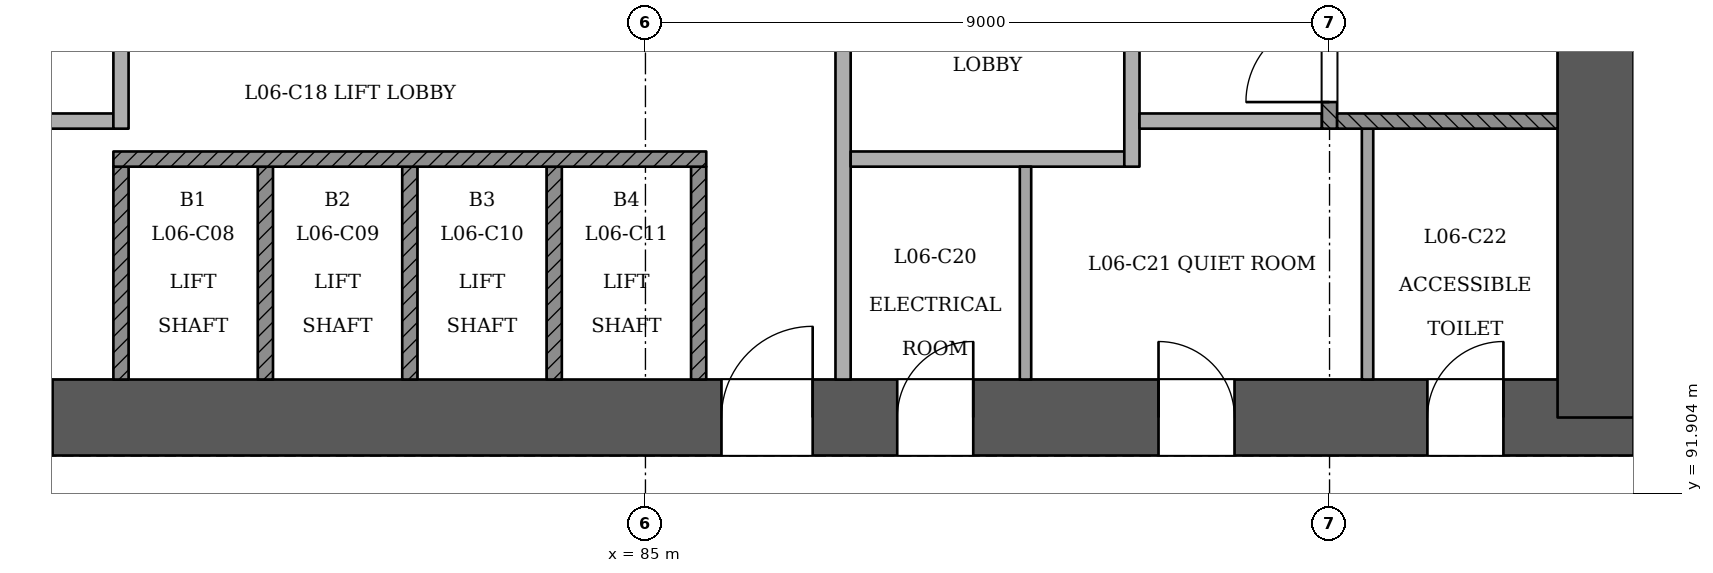
"""IFC4 building model, lengths in metres.
Left out: names, types, materials, properties, quantities, classifications, styles, units other than length and angle.
Written with IfcOpenShell. Run it as: python <this file> out.ifc"""

import sys

from ifc_helpers import new_model, si_unit, direction, frame, frame_2d, origin, place, context, subcontext, project, spatial, rectangle, extrude, element, fill, save


model = new_model("IFC4")
c1 = context("Model", 3, precision=1e-05, world=origin(), true_north=direction((0.0, 1.0)))
c2 = subcontext(c1, "Body", "Model", "MODEL_VIEW")
j1 = project(units=[si_unit("LENGTHUNIT", "METRE"), si_unit("PLANEANGLEUNIT", "RADIAN")], contexts=[c1])
p1 = place(None, origin())
s1 = spatial("IfcSite", under=j1, at=p1, CompositionType="ELEMENT")
p2 = place(p1, origin())
s2 = spatial("IfcBuilding", under=s1, at=p2, CompositionType="ELEMENT")
p3 = place(p2, frame((0.0, 0.0, 30.6)))
s3 = spatial("IfcBuildingStorey", under=s2, at=p3, CompositionType="ELEMENT", Elevation=30.6)
p4 = place(p3, frame((72.5, 92.9, 0.0), z_axis=(0.0, 0.0, 1.0), x_axis=(1.0, 0.0, 0.0)))
e1 = element("IfcWall", 1, at=p4, inside=s3, PredefinedType="SHEAR", context=c2, shape_type="SweptSolid", body=[
    extrude(rectangle(XDim=25.5, YDim=1.0, at=frame_2d((12.75, 0.0))), origin(), (0.0, 0.0, 1.0), 3.6),
])
p5 = place(p4, frame((1.3, 0.0, 0.0)))
e2 = element("IfcOpeningElement", 2, at=p5, cuts=e1, PredefinedType="OPENING", context=c2, shape_type="SweptSolid", body=[
    extrude(rectangle(XDim=1.2, YDim=2.1, at=frame_2d((0.6, 1.05))), frame((0.0, 0.51, 0.0), z_axis=(0.0, -1.0, 0.0), x_axis=(1.0, 0.0, 0.0)), (0.0, 0.0, 1.0), 1.021),
])
p6 = place(p4, frame((3.5, 0.0, 0.0)))
e3 = element("IfcOpeningElement", 3, at=p6, cuts=e1, PredefinedType="OPENING", context=c2, shape_type="SweptSolid", body=[
    extrude(rectangle(XDim=1.2, YDim=2.1, at=frame_2d((0.6, 1.05))), frame((0.0, 0.51, 0.0), z_axis=(0.0, -1.0, 0.0), x_axis=(1.0, 0.0, 0.0)), (0.0, 0.0, 1.0), 1.021),
])
p7 = place(p4, frame((13.5, 0.0, 0.0)))
e4 = element("IfcOpeningElement", 4, at=p7, cuts=e1, PredefinedType="OPENING", context=c2, shape_type="SweptSolid", body=[
    extrude(rectangle(XDim=1.2, YDim=2.1, at=frame_2d((0.6, 1.05))), frame((0.0, 0.51, 0.0), z_axis=(0.0, -1.0, 0.0), x_axis=(1.0, 0.0, 0.0)), (0.0, 0.0, 1.0), 1.021),
])
p8 = place(p4, frame((15.812, 0.0, 0.0)))
e5 = element("IfcOpeningElement", 5, at=p8, cuts=e1, PredefinedType="OPENING", context=c2, shape_type="SweptSolid", body=[
    extrude(rectangle(XDim=1.0, YDim=2.1, at=frame_2d((0.5, 1.05))), frame((0.0, 0.51, 0.0), z_axis=(0.0, -1.0, 0.0), x_axis=(1.0, 0.0, 0.0)), (0.0, 0.0, 1.0), 1.021),
])
p9 = place(p4, frame((19.25, 0.0, 0.0)))
e6 = element("IfcOpeningElement", 6, at=p9, cuts=e1, PredefinedType="OPENING", context=c2, shape_type="SweptSolid", body=[
    extrude(rectangle(XDim=1.0, YDim=2.1, at=frame_2d((0.5, 1.05))), frame((0.0, 0.51, 0.0), z_axis=(0.0, -1.0, 0.0), x_axis=(1.0, 0.0, 0.0)), (0.0, 0.0, 1.0), 1.021),
])
p10 = place(p4, frame((22.788, 0.0, 0.0)))
e7 = element("IfcOpeningElement", 7, at=p10, cuts=e1, PredefinedType="OPENING", context=c2, shape_type="SweptSolid", body=[
    extrude(rectangle(XDim=1.0, YDim=2.1, at=frame_2d((0.5, 1.05))), frame((0.0, 0.51, 0.0), z_axis=(0.0, -1.0, 0.0), x_axis=(1.0, 0.0, 0.0)), (0.0, 0.0, 1.0), 1.021),
])
p11 = place(p3, frame((97.5, 92.9, 0.0), z_axis=(0.0, 0.0, 1.0), x_axis=(0.0, 1.0, 0.0)))
e8 = element("IfcWall", 8, at=p11, inside=s3, PredefinedType="SHEAR", context=c2, shape_type="SweptSolid", body=[
    extrude(rectangle(XDim=11.5, YDim=1.0, at=frame_2d((5.75, 0.0))), origin(), (0.0, 0.0, 1.0), 3.6),
])
p12 = place(p3, frame((61.273, 96.374, 0.0), z_axis=(0.0, 0.0, 1.0), x_axis=(0.5000018851, -0.866024315419, 0.0)))
e9 = element("IfcWall", 9, at=p12, inside=s3, PredefinedType="PARTITIONING", context=c2, shape_type="SweptSolid", body=[
    extrude(rectangle(XDim=45.0, YDim=0.15, at=frame_2d((22.5, 0.0))), origin(), (0.0, 0.0, 1.0), 2.7),
])
p13 = place(p12, frame((2.829, 0.0, 0.0)))
e10 = element("IfcOpeningElement", 10, at=p13, cuts=e9, PredefinedType="OPENING", context=c2, shape_type="SweptSolid", body=[
    extrude(rectangle(XDim=1.1, YDim=2.1, at=frame_2d((0.55, 1.05))), frame((0.0, 0.085, 0.0), z_axis=(0.0, -1.0, 0.0), x_axis=(1.0, 0.0, 0.0)), (0.0, 0.0, 1.0), 0.171),
])
p14 = place(p12, frame((7.3, 0.0, 0.0)))
e11 = element("IfcOpeningElement", 11, at=p14, cuts=e9, PredefinedType="OPENING", context=c2, shape_type="SweptSolid", body=[
    extrude(rectangle(XDim=1.2, YDim=2.1, at=frame_2d((0.6, 1.05))), frame((0.0, 0.085, 0.0), z_axis=(0.0, -1.0, 0.0), x_axis=(1.0, 0.0, 0.0)), (0.0, 0.0, 1.0), 0.171),
])
p15 = place(p12, frame((14.22, 0.0, 0.0)))
e12 = element("IfcOpeningElement", 12, at=p15, cuts=e9, PredefinedType="OPENING", context=c2, shape_type="SweptSolid", body=[
    extrude(rectangle(XDim=1.0, YDim=2.1, at=frame_2d((0.5, 1.05))), frame((0.0, 0.085, 0.0), z_axis=(0.0, -1.0, 0.0), x_axis=(1.0, 0.0, 0.0)), (0.0, 0.0, 1.0), 0.171),
])
p16 = place(p12, frame((20.895, 0.0, 0.0)))
e13 = element("IfcOpeningElement", 13, at=p16, cuts=e9, PredefinedType="OPENING", context=c2, shape_type="SweptSolid", body=[
    extrude(rectangle(XDim=1.0, YDim=2.1, at=frame_2d((0.5, 1.05))), frame((0.0, 0.085, 0.0), z_axis=(0.0, -1.0, 0.0), x_axis=(1.0, 0.0, 0.0)), (0.0, 0.0, 1.0), 0.171),
])
p17 = place(p12, frame((24.25, 0.0, 0.0)))
e14 = element("IfcOpeningElement", 14, at=p17, cuts=e9, PredefinedType="OPENING", context=c2, shape_type="SweptSolid", body=[
    extrude(rectangle(XDim=1.0, YDim=2.1, at=frame_2d((0.5, 1.05))), frame((0.0, 0.085, 0.0), z_axis=(0.0, -1.0, 0.0), x_axis=(1.0, 0.0, 0.0)), (0.0, 0.0, 1.0), 0.171),
])
p18 = place(p12, frame((29.78, 0.0, 0.0)))
e15 = element("IfcOpeningElement", 15, at=p18, cuts=e9, PredefinedType="OPENING", context=c2, shape_type="SweptSolid", body=[
    extrude(rectangle(XDim=1.0, YDim=2.1, at=frame_2d((0.5, 1.05))), frame((0.0, 0.085, 0.0), z_axis=(0.0, -1.0, 0.0), x_axis=(1.0, 0.0, 0.0)), (0.0, 0.0, 1.0), 0.171),
])
p19 = place(p12, frame((34.3, 0.0, 0.0)))
e16 = element("IfcOpeningElement", 16, at=p19, cuts=e9, PredefinedType="OPENING", context=c2, shape_type="SweptSolid", body=[
    extrude(rectangle(XDim=1.2, YDim=2.1, at=frame_2d((0.6, 1.05))), frame((0.0, 0.085, 0.0), z_axis=(0.0, -1.0, 0.0), x_axis=(1.0, 0.0, 0.0)), (0.0, 0.0, 1.0), 0.171),
])
p20 = place(p12, frame((41.22, 0.0, 0.0)))
e17 = element("IfcOpeningElement", 17, at=p20, cuts=e9, PredefinedType="OPENING", context=c2, shape_type="SweptSolid", body=[
    extrude(rectangle(XDim=1.0, YDim=2.1, at=frame_2d((0.5, 1.05))), frame((0.0, 0.085, 0.0), z_axis=(0.0, -1.0, 0.0), x_axis=(1.0, 0.0, 0.0)), (0.0, 0.0, 1.0), 0.171),
])
p21 = place(p3, frame((86.227, 57.403, 0.0), z_axis=(0.0, 0.0, 1.0), x_axis=(0.5000018851, 0.866024315419, 0.0)))
e18 = element("IfcWall", 18, at=p21, inside=s3, PredefinedType="PARTITIONING", context=c2, shape_type="SweptSolid", body=[
    extrude(rectangle(XDim=45.0, YDim=0.15, at=frame_2d((22.5, 0.0))), origin(), (0.0, 0.0, 1.0), 2.7),
])
p22 = place(p21, frame((0.72, 0.0, 0.0)))
e19 = element("IfcOpeningElement", 19, at=p22, cuts=e18, PredefinedType="OPENING", context=c2, shape_type="SweptSolid", body=[
    extrude(rectangle(XDim=1.0, YDim=2.1, at=frame_2d((0.5, 1.05))), frame((0.0, 0.085, 0.0), z_axis=(0.0, -1.0, 0.0), x_axis=(1.0, 0.0, 0.0)), (0.0, 0.0, 1.0), 0.171),
])
p23 = place(p21, frame((5.22, 0.0, 0.0)))
e20 = element("IfcOpeningElement", 20, at=p23, cuts=e18, PredefinedType="OPENING", context=c2, shape_type="SweptSolid", body=[
    extrude(rectangle(XDim=1.0, YDim=2.1, at=frame_2d((0.5, 1.05))), frame((0.0, 0.085, 0.0), z_axis=(0.0, -1.0, 0.0), x_axis=(1.0, 0.0, 0.0)), (0.0, 0.0, 1.0), 0.171),
])
p24 = place(p21, frame((11.78, 0.0, 0.0)))
e21 = element("IfcOpeningElement", 21, at=p24, cuts=e18, PredefinedType="OPENING", context=c2, shape_type="SweptSolid", body=[
    extrude(rectangle(XDim=1.0, YDim=2.1, at=frame_2d((0.5, 1.05))), frame((0.0, 0.085, 0.0), z_axis=(0.0, -1.0, 0.0), x_axis=(1.0, 0.0, 0.0)), (0.0, 0.0, 1.0), 0.171),
])
p25 = place(p21, frame((14.22, 0.0, 0.0)))
e22 = element("IfcOpeningElement", 22, at=p25, cuts=e18, PredefinedType="OPENING", context=c2, shape_type="SweptSolid", body=[
    extrude(rectangle(XDim=1.0, YDim=2.1, at=frame_2d((0.5, 1.05))), frame((0.0, 0.085, 0.0), z_axis=(0.0, -1.0, 0.0), x_axis=(1.0, 0.0, 0.0)), (0.0, 0.0, 1.0), 0.171),
])
p26 = place(p21, frame((19.75, 0.0, 0.0)))
e23 = element("IfcOpeningElement", 23, at=p26, cuts=e18, PredefinedType="OPENING", context=c2, shape_type="SweptSolid", body=[
    extrude(rectangle(XDim=1.0, YDim=2.1, at=frame_2d((0.5, 1.05))), frame((0.0, 0.085, 0.0), z_axis=(0.0, -1.0, 0.0), x_axis=(1.0, 0.0, 0.0)), (0.0, 0.0, 1.0), 0.171),
])
p27 = place(p21, frame((23.105, 0.0, 0.0)))
e24 = element("IfcOpeningElement", 24, at=p27, cuts=e18, PredefinedType="OPENING", context=c2, shape_type="SweptSolid", body=[
    extrude(rectangle(XDim=1.0, YDim=2.1, at=frame_2d((0.5, 1.05))), frame((0.0, 0.085, 0.0), z_axis=(0.0, -1.0, 0.0), x_axis=(1.0, 0.0, 0.0)), (0.0, 0.0, 1.0), 0.171),
])
p28 = place(p21, frame((28.75, 0.0, 0.0)))
e25 = element("IfcOpeningElement", 25, at=p28, cuts=e18, PredefinedType="OPENING", context=c2, shape_type="SweptSolid", body=[
    extrude(rectangle(XDim=1.0, YDim=2.1, at=frame_2d((0.5, 1.05))), frame((0.0, 0.085, 0.0), z_axis=(0.0, -1.0, 0.0), x_axis=(1.0, 0.0, 0.0)), (0.0, 0.0, 1.0), 0.171),
])
p29 = place(p21, frame((32.105, 0.0, 0.0)))
e26 = element("IfcOpeningElement", 26, at=p29, cuts=e18, PredefinedType="OPENING", context=c2, shape_type="SweptSolid", body=[
    extrude(rectangle(XDim=1.0, YDim=2.1, at=frame_2d((0.5, 1.05))), frame((0.0, 0.085, 0.0), z_axis=(0.0, -1.0, 0.0), x_axis=(1.0, 0.0, 0.0)), (0.0, 0.0, 1.0), 0.171),
])
p30 = place(p21, frame((36.504, 0.0, 0.0)))
e27 = element("IfcOpeningElement", 27, at=p30, cuts=e18, PredefinedType="OPENING", context=c2, shape_type="SweptSolid", body=[
    extrude(rectangle(XDim=1.0, YDim=2.1, at=frame_2d((0.5, 1.05))), frame((0.0, 0.085, 0.0), z_axis=(0.0, -1.0, 0.0), x_axis=(1.0, 0.0, 0.0)), (0.0, 0.0, 1.0), 0.171),
])
p31 = place(p21, frame((38.654, 0.0, 0.0)))
e28 = element("IfcOpeningElement", 28, at=p31, cuts=e18, PredefinedType="OPENING", context=c2, shape_type="SweptSolid", body=[
    extrude(rectangle(XDim=1.0, YDim=2.1, at=frame_2d((0.5, 1.05))), frame((0.0, 0.085, 0.0), z_axis=(0.0, -1.0, 0.0), x_axis=(1.0, 0.0, 0.0)), (0.0, 0.0, 1.0), 0.171),
])
p32 = place(p21, frame((41.071, 0.0, 0.0)))
e29 = element("IfcOpeningElement", 29, at=p32, cuts=e18, PredefinedType="OPENING", context=c2, shape_type="SweptSolid", body=[
    extrude(rectangle(XDim=1.1, YDim=2.1, at=frame_2d((0.55, 1.05))), frame((0.0, 0.085, 0.0), z_axis=(0.0, -1.0, 0.0), x_axis=(1.0, 0.0, 0.0)), (0.0, 0.0, 1.0), 0.171),
])
for number, where, z_axis, x_axis in (
    (30, (78.1, 93.4, 0.0), (0.0, 0.0, 1.0), (0.0, 1.0, 0.0)),
    (31, (80.0, 93.4, 0.0), (0.0, 0.0, 1.0), (0.0, 1.0, 0.0)),
    (32, (81.9, 93.4, 0.0), (0.0, 0.0, 1.0), (0.0, 1.0, 0.0)),
    (33, (83.8, 93.4, 0.0), (0.0, 0.0, 1.0), (0.0, 1.0, 0.0)),
    (34, (85.7, 93.4, 0.0), (0.0, 0.0, 1.0), (0.0, 1.0, 0.0)),
):
    element("IfcWall", number, at=place(p3, frame(where, z_axis=z_axis, x_axis=x_axis)), inside=s3, PredefinedType="SOLIDWALL", context=c2, shape_type="SweptSolid", body=[
        extrude(rectangle(XDim=2.8, YDim=0.2, at=frame_2d((1.4, 0.0))), origin(), (0.0, 0.0, 1.0), 3.1),
    ])
p33 = place(p3, frame((87.6, 93.4, 0.0), z_axis=(0.0, 0.0, 1.0), x_axis=(0.0, 1.0, 0.0)))
e35 = element("IfcWall", 35, at=p33, inside=s3, PredefinedType="PARTITIONING", context=c2, shape_type="SweptSolid", body=[
    extrude(rectangle(XDim=7.0, YDim=0.2, at=frame_2d((3.5, 0.0))), origin(), (0.0, 0.0, 1.0), 3.1),
])
p34 = place(p33, frame((4.45, 0.0, 0.0)))
e36 = element("IfcOpeningElement", 36, at=p34, cuts=e35, PredefinedType="OPENING", context=c2, shape_type="SweptSolid", body=[
    extrude(rectangle(XDim=1.1, YDim=2.1, at=frame_2d((0.55, 1.05))), frame((0.0, 0.11, 0.0), z_axis=(0.0, -1.0, 0.0), x_axis=(1.0, 0.0, 0.0)), (0.0, 0.0, 1.0), 0.221),
])
p35 = place(p3, frame((90.0, 93.4, 0.0), z_axis=(0.0, 0.0, 1.0), x_axis=(0.0, 1.0, 0.0)))
e37 = element("IfcWall", 37, at=p35, inside=s3, PredefinedType="PARTITIONING", context=c2, shape_type="SweptSolid", body=[
    extrude(rectangle(XDim=2.8, YDim=0.15, at=frame_2d((1.4, 0.0))), origin(), (0.0, 0.0, 1.0), 3.1),
])
p36 = place(p3, frame((94.5, 93.4, 0.0), z_axis=(0.0, 0.0, 1.0), x_axis=(0.0, 1.0, 0.0)))
e38 = element("IfcWall", 38, at=p36, inside=s3, PredefinedType="PARTITIONING", context=c2, shape_type="SweptSolid", body=[
    extrude(rectangle(XDim=3.3, YDim=0.15, at=frame_2d((1.65, 0.0))), origin(), (0.0, 0.0, 1.0), 3.1),
])
p37 = place(p3, frame((78.0, 96.3, 0.0), z_axis=(0.0, 0.0, 1.0), x_axis=(1.0, 0.0, 0.0)))
e39 = element("IfcWall", 39, at=p37, inside=s3, PredefinedType="SOLIDWALL", context=c2, shape_type="SweptSolid", body=[
    extrude(rectangle(XDim=7.8, YDim=0.2, at=frame_2d((3.9, 0.0))), origin(), (0.0, 0.0, 1.0), 3.1),
])
p38 = place(p3, frame((87.7, 96.3, 0.0), z_axis=(0.0, 0.0, 1.0), x_axis=(1.0, 0.0, 0.0)))
e40 = element("IfcWall", 40, at=p38, inside=s3, PredefinedType="PARTITIONING", context=c2, shape_type="SweptSolid", body=[
    extrude(rectangle(XDim=3.6, YDim=0.2, at=frame_2d((1.8, 0.0))), origin(), (0.0, 0.0, 1.0), 3.1),
])
p39 = place(p3, frame((91.4, 96.2, 0.0), z_axis=(0.0, 0.0, 1.0), x_axis=(0.0, 1.0, 0.0)))
e41 = element("IfcWall", 41, at=p39, inside=s3, PredefinedType="PARTITIONING", context=c2, shape_type="SweptSolid", body=[
    extrude(rectangle(XDim=4.2, YDim=0.2, at=frame_2d((2.1, 0.0))), origin(), (0.0, 0.0, 1.0), 3.1),
])
p40 = place(p39, frame((2.45, 0.0, 0.0)))
e42 = element("IfcOpeningElement", 42, at=p40, cuts=e41, PredefinedType="OPENING", context=c2, shape_type="SweptSolid", body=[
    extrude(rectangle(XDim=1.1, YDim=2.1, at=frame_2d((0.55, 1.05))), frame((0.0, 0.11, 0.0), z_axis=(0.0, -1.0, 0.0), x_axis=(1.0, 0.0, 0.0)), (0.0, 0.0, 1.0), 0.221),
])
p41 = place(p3, frame((76.1, 96.8, 0.0), z_axis=(0.0, 0.0, 1.0), x_axis=(1.0, 0.0, 0.0)))
e43 = element("IfcWall", 43, at=p41, inside=s3, PredefinedType="PARTITIONING", context=c2, shape_type="SweptSolid", body=[
    extrude(rectangle(XDim=1.9, YDim=0.2, at=frame_2d((0.95, 0.0))), origin(), (0.0, 0.0, 1.0), 3.1),
])
p42 = place(p3, frame((78.1, 96.7, 0.0), z_axis=(0.0, 0.0, 1.0), x_axis=(0.0, 1.0, 0.0)))
e44 = element("IfcWall", 44, at=p42, inside=s3, PredefinedType="PARTITIONING", context=c2, shape_type="SweptSolid", body=[
    extrude(rectangle(XDim=3.7, YDim=0.2, at=frame_2d((1.85, 0.0))), origin(), (0.0, 0.0, 1.0), 3.1),
])
p43 = place(p42, frame((1.95, 0.0, 0.0)))
e45 = element("IfcOpeningElement", 45, at=p43, cuts=e44, PredefinedType="OPENING", context=c2, shape_type="SweptSolid", body=[
    extrude(rectangle(XDim=1.1, YDim=2.1, at=frame_2d((0.55, 1.05))), frame((0.0, 0.11, 0.0), z_axis=(0.0, -1.0, 0.0), x_axis=(1.0, 0.0, 0.0)), (0.0, 0.0, 1.0), 0.221),
])
p44 = place(p3, frame((91.5, 96.8, 0.0), z_axis=(0.0, 0.0, 1.0), x_axis=(1.0, 0.0, 0.0)))
e46 = element("IfcWall", 46, at=p44, inside=s3, PredefinedType="PARTITIONING", context=c2, shape_type="SweptSolid", body=[
    extrude(rectangle(XDim=2.4, YDim=0.2, at=frame_2d((1.2, 0.0))), origin(), (0.0, 0.0, 1.0), 3.1),
])
p45 = place(p3, frame((94.0, 96.7, 0.0), z_axis=(0.0, 0.0, 1.0), x_axis=(0.0, 1.0, 0.0)))
e47 = element("IfcWall", 47, at=p45, inside=s3, PredefinedType="SOLIDWALL", context=c2, shape_type="SweptSolid", body=[
    extrude(rectangle(XDim=3.7, YDim=0.2, at=frame_2d((1.85, 0.0))), origin(), (0.0, 0.0, 1.0), 3.1),
])
p46 = place(p45, frame((0.35, 0.0, 0.0)))
e48 = element("IfcOpeningElement", 48, at=p46, cuts=e47, PredefinedType="OPENING", context=c2, shape_type="SweptSolid", body=[
    extrude(rectangle(XDim=1.1, YDim=2.1, at=frame_2d((0.55, 1.05))), frame((0.0, 0.11, 0.0), z_axis=(0.0, -1.0, 0.0), x_axis=(1.0, 0.0, 0.0)), (0.0, 0.0, 1.0), 0.221),
])
p47 = place(p3, frame((94.1, 96.8, 0.0), z_axis=(0.0, 0.0, 1.0), x_axis=(1.0, 0.0, 0.0)))
e49 = element("IfcWall", 49, at=p47, inside=s3, PredefinedType="SOLIDWALL", context=c2, shape_type="SweptSolid", body=[
    extrude(rectangle(XDim=2.9, YDim=0.2, at=frame_2d((1.45, 0.0))), origin(), (0.0, 0.0, 1.0), 3.1),
])
p48 = place(p46, origin())
e50 = element("IfcDoor", 50, at=p48, inside=s3, OperationType="SINGLE_SWING_LEFT", PredefinedType="NOTDEFINED", context=c2, shape_type="SweptSolid", body=[
    extrude(rectangle(XDim=1.1, YDim=2.1, at=frame_2d((0.55, 1.05))), frame((0.0, 0.025, 0.0), z_axis=(0.0, -1.0, 0.0), x_axis=(1.0, 0.0, 0.0)), (0.0, 0.0, 1.0), 0.05),
])
fill(e48, e50)
p49 = place(p6, origin())
e51 = element("IfcDoor", 51, at=p49, inside=s3, OperationType="SINGLE_SWING_LEFT", PredefinedType="NOTDEFINED", context=c2, shape_type="SweptSolid", body=[
    extrude(rectangle(XDim=1.2, YDim=2.1, at=frame_2d((0.6, 1.05))), frame((0.0, 0.025, 0.0), z_axis=(0.0, -1.0, 0.0), x_axis=(1.0, 0.0, 0.0)), (0.0, 0.0, 1.0), 0.05),
])
fill(e3, e51)
p50 = place(p7, origin())
e52 = element("IfcDoor", 52, at=p50, inside=s3, OperationType="SINGLE_SWING_RIGHT", PredefinedType="NOTDEFINED", context=c2, shape_type="SweptSolid", body=[
    extrude(rectangle(XDim=1.2, YDim=2.1, at=frame_2d((0.6, 1.05))), frame((0.0, 0.025, 0.0), z_axis=(0.0, -1.0, 0.0), x_axis=(1.0, 0.0, 0.0)), (0.0, 0.0, 1.0), 0.05),
])
fill(e4, e52)
p51 = place(p8, origin())
e53 = element("IfcDoor", 53, at=p51, inside=s3, OperationType="SINGLE_SWING_RIGHT", PredefinedType="NOTDEFINED", context=c2, shape_type="SweptSolid", body=[
    extrude(rectangle(XDim=1.0, YDim=2.1, at=frame_2d((0.5, 1.05))), frame((0.0, 0.025, 0.0), z_axis=(0.0, -1.0, 0.0), x_axis=(1.0, 0.0, 0.0)), (0.0, 0.0, 1.0), 0.05),
])
fill(e5, e53)
p52 = place(p9, origin())
e54 = element("IfcDoor", 54, at=p52, inside=s3, OperationType="SINGLE_SWING_LEFT", PredefinedType="NOTDEFINED", context=c2, shape_type="SweptSolid", body=[
    extrude(rectangle(XDim=1.0, YDim=2.1, at=frame_2d((0.5, 1.05))), frame((0.0, 0.025, 0.0), z_axis=(0.0, -1.0, 0.0), x_axis=(1.0, 0.0, 0.0)), (0.0, 0.0, 1.0), 0.05),
])
fill(e6, e54)
p53 = place(p10, origin())
e55 = element("IfcDoor", 55, at=p53, inside=s3, OperationType="SINGLE_SWING_RIGHT", PredefinedType="NOTDEFINED", context=c2, shape_type="SweptSolid", body=[
    extrude(rectangle(XDim=1.0, YDim=2.1, at=frame_2d((0.5, 1.05))), frame((0.0, 0.025, 0.0), z_axis=(0.0, -1.0, 0.0), x_axis=(1.0, 0.0, 0.0)), (0.0, 0.0, 1.0), 0.05),
])
fill(e7, e55)
save(model, sys.argv[1])
